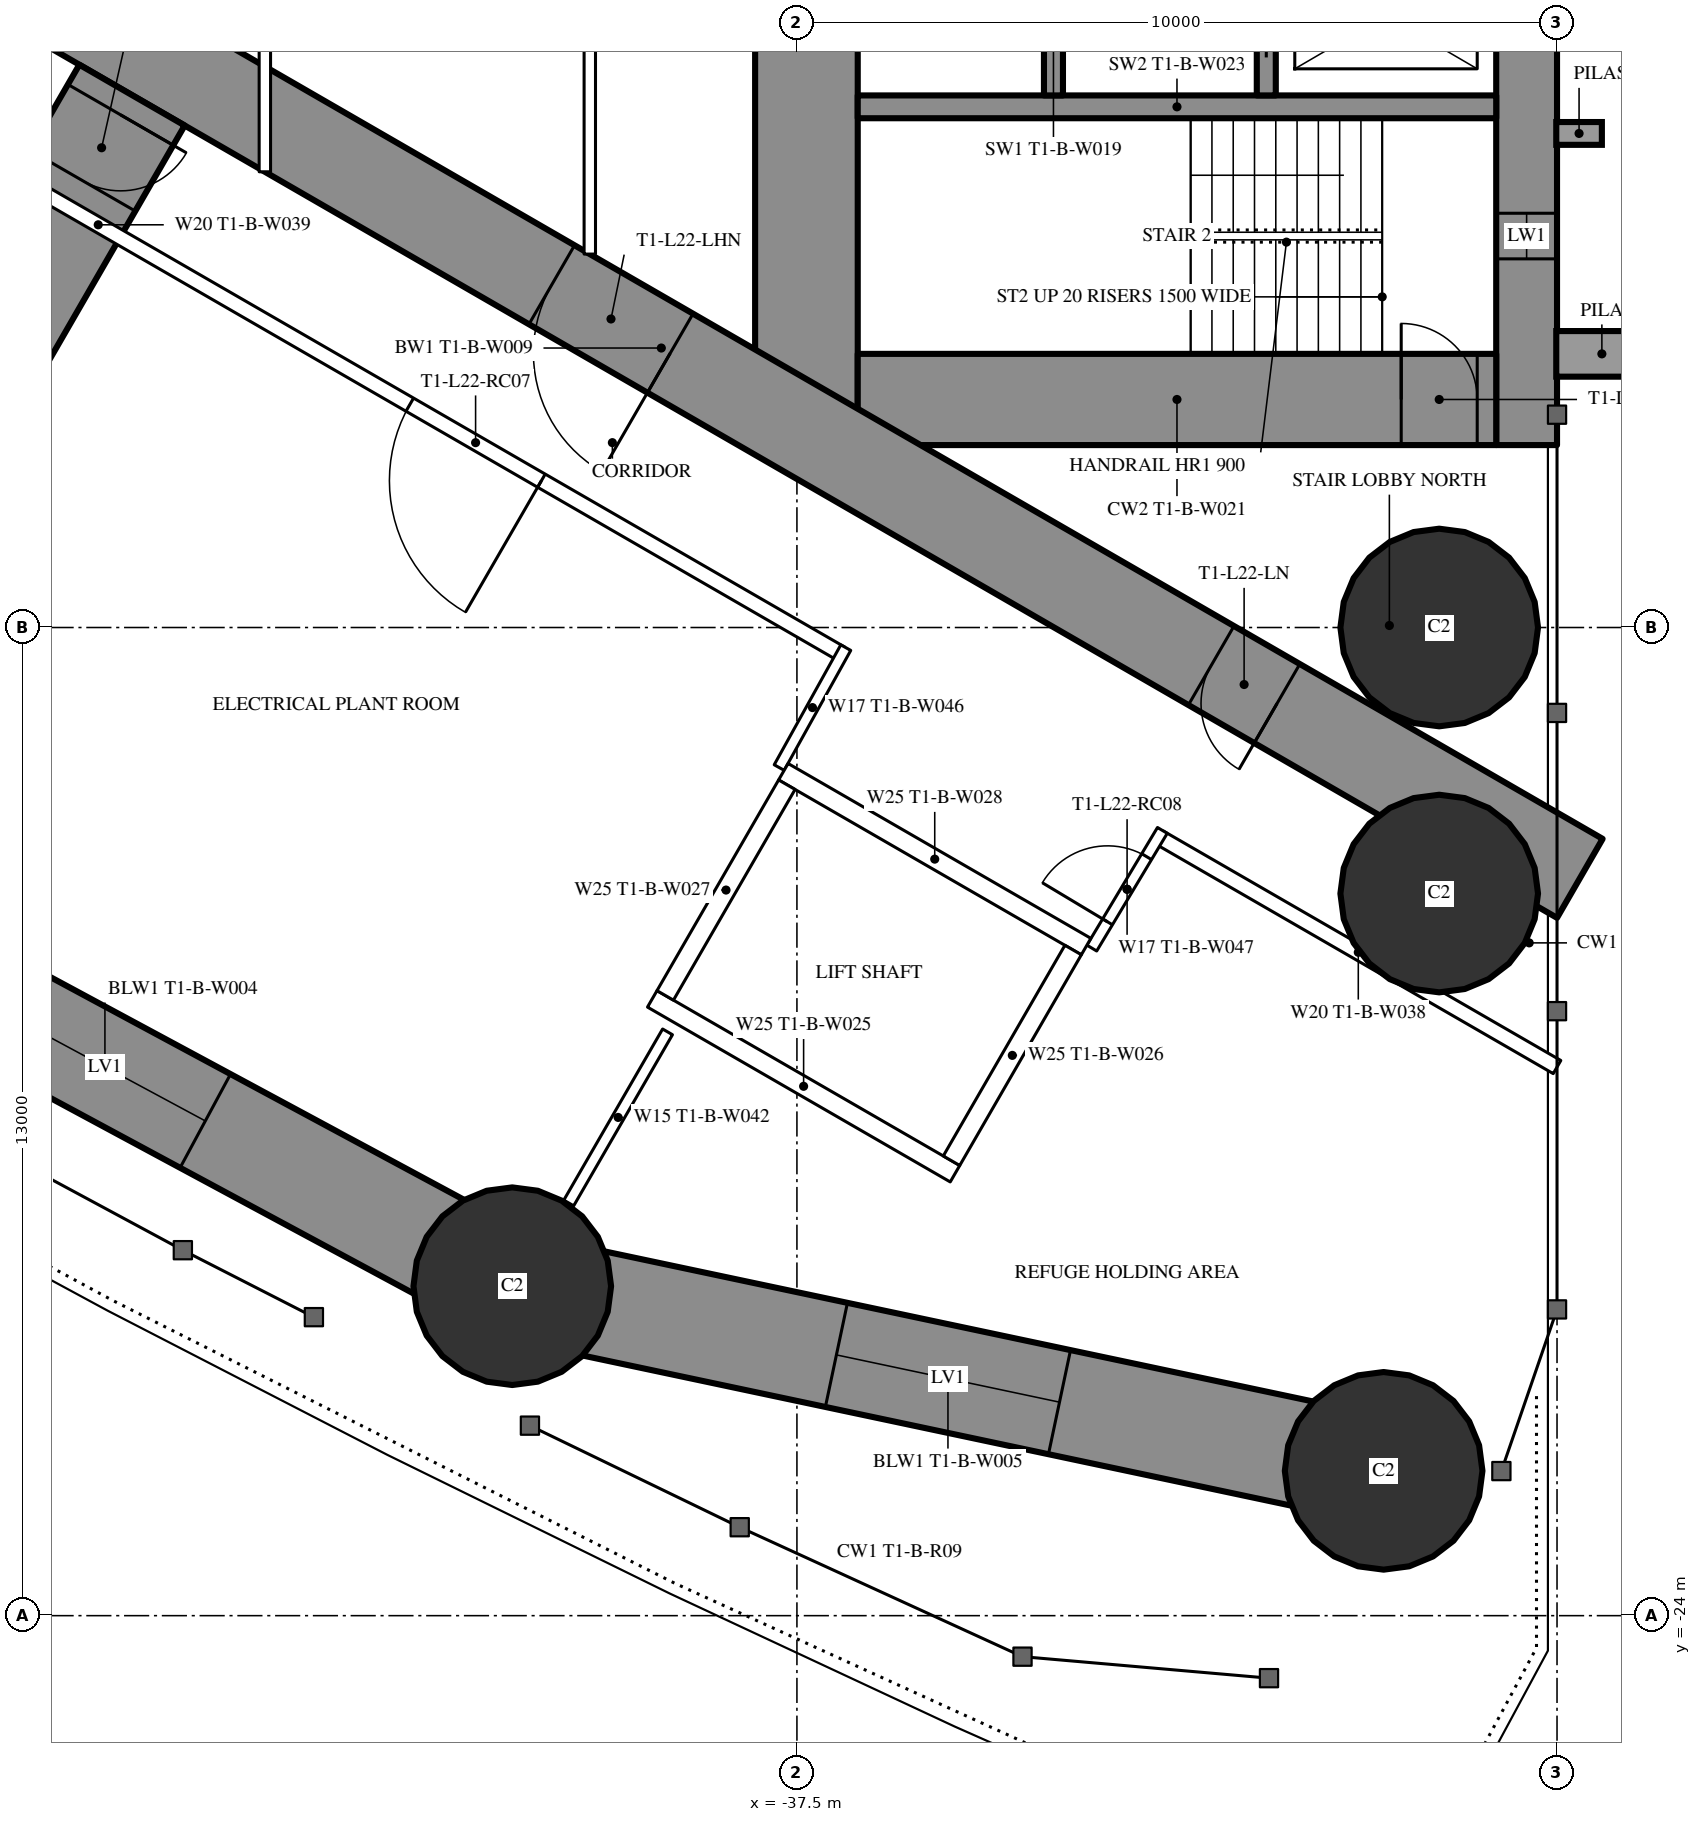
"""IFC4 building model, lengths in metres.
Left out: names, types, materials, properties, quantities, classifications, styles, units other than length and angle.
Written with IfcOpenShell. Run it as: python <this file> out.ifc"""

import sys

from ifc_helpers import new_model, si_unit, direction, frame, frame_2d, origin, origin_2d, place, context, subcontext, project, spatial, rectangle, hollow_circle, extrude, element, fill, save


model = new_model("IFC4")
c1 = context("Model", 3, precision=1e-05, world=origin(), true_north=direction((0.0, 1.0)))
c2 = subcontext(c1, "Body", "Model", "MODEL_VIEW")
j1 = project(units=[si_unit("LENGTHUNIT", "METRE"), si_unit("PLANEANGLEUNIT", "RADIAN")], contexts=[c1])
p1 = place(None, origin())
s1 = spatial("IfcSite", under=j1, at=p1, CompositionType="ELEMENT")
p2 = place(p1, origin())
s2 = spatial("IfcBuilding", under=s1, at=p2, CompositionType="ELEMENT")
p3 = place(p2, frame((0.0, 0.0, 87.0)))
s3 = spatial("IfcBuildingStorey", under=s2, at=p3, CompositionType="ELEMENT", Elevation=87.0)
for number, where, z_axis, x_axis in (
    (1, (-29.781, -22.095, 0.0), (0.0, 0.0, 1.0), (1.0, 0.0, 0.0)),
    (2, (-29.05, -11.0, 0.0), (0.0, 0.0, 1.0), (1.0, 0.0, 0.0)),
    (3, (-29.05, -14.5, 0.0), (0.0, 0.0, 1.0), (1.0, 0.0, 0.0)),
    (4, (-41.245, -19.666, 0.0), (0.0, 0.0, 1.0), (1.0, 0.0, 0.0)),
):
    element("IfcColumn", number, at=place(p3, frame(where, z_axis=z_axis, x_axis=x_axis)), inside=s3, PredefinedType="COLUMN", context=c2, shape_type="SweptSolid", body=[
        extrude(hollow_circle(Radius=1.3, WallThickness=0.1, at=origin_2d()), origin(), (0.0, 0.0, 1.0), 3.6),
    ])
p4 = place(p3, frame((-27.9, 8.6, 0.0), z_axis=(0.0, 0.0, 1.0), x_axis=(0.0, -1.0, 0.0)))
e5 = element("IfcWall", 5, at=p4, inside=s3, PredefinedType="SHEAR", context=c2, shape_type="SweptSolid", body=[
    extrude(rectangle(XDim=17.2, YDim=0.8, at=frame_2d((8.6, 0.0))), origin(), (0.0, 0.0, 1.0), 3.6),
])
p5 = place(p4, frame((2.45, 0.0, 0.6)))
e6 = element("IfcOpeningElement", 6, at=p5, cuts=e5, PredefinedType="OPENING", context=c2, shape_type="SweptSolid", body=[
    extrude(rectangle(XDim=0.6, YDim=2.1, at=frame_2d((0.3, 1.05))), frame((0.0, 0.41, 0.0), z_axis=(0.0, -1.0, 0.0), x_axis=(1.0, 0.0, 0.0)), (0.0, 0.0, 1.0), 0.82),
])
p6 = place(p4, frame((14.15, 0.0, 0.6)))
e7 = element("IfcOpeningElement", 7, at=p6, cuts=e5, PredefinedType="OPENING", context=c2, shape_type="SweptSolid", body=[
    extrude(rectangle(XDim=0.6, YDim=2.1, at=frame_2d((0.3, 1.05))), frame((0.0, 0.41, 0.0), z_axis=(0.0, -1.0, 0.0), x_axis=(1.0, 0.0, 0.0)), (0.0, 0.0, 1.0), 0.82),
])
p7 = place(p3, frame((-37.375, 8.6, 0.0), z_axis=(0.0, 0.0, 1.0), x_axis=(0.0, -1.0, 0.0)))
e8 = element("IfcWall", 8, at=p7, inside=s3, PredefinedType="SHEAR", context=c2, shape_type="SweptSolid", body=[
    extrude(rectangle(XDim=17.2, YDim=1.35, at=frame_2d((8.6, 0.0))), origin(), (0.0, 0.0, 1.0), 3.6),
])
p8 = place(p7, frame((7.7, 0.0, 0.0)))
e9 = element("IfcOpeningElement", 9, at=p8, cuts=e8, PredefinedType="OPENING", context=c2, shape_type="SweptSolid", body=[
    extrude(rectangle(XDim=1.8, YDim=2.2, at=frame_2d((0.9, 1.1))), frame((0.0, 0.685, 0.0), z_axis=(0.0, -1.0, 0.0), x_axis=(1.0, 0.0, 0.0)), (0.0, 0.0, 1.0), 1.37),
])
p9 = place(p3, frame((-28.3, -8.0, 0.0), z_axis=(0.0, 0.0, 1.0), x_axis=(-1.0, 0.0, 0.0)))
e10 = element("IfcWall", 10, at=p9, inside=s3, PredefinedType="SHEAR", context=c2, shape_type="SweptSolid", body=[
    extrude(rectangle(XDim=8.4, YDim=1.2, at=frame_2d((4.2, 0.0))), origin(), (0.0, 0.0, 1.0), 3.6),
])
p10 = place(p9, frame((0.25, 0.0, 0.0)))
e11 = element("IfcOpeningElement", 11, at=p10, cuts=e10, PredefinedType="OPENING", context=c2, shape_type="SweptSolid", body=[
    extrude(rectangle(XDim=1.0, YDim=2.2, at=frame_2d((0.5, 1.1))), frame((0.0, 0.61, 0.0), z_axis=(0.0, -1.0, 0.0), x_axis=(1.0, 0.0, 0.0)), (0.0, 0.0, 1.0), 1.22),
])
p11 = place(p3, frame((-28.3, -4.15, 0.0), z_axis=(0.0, 0.0, 1.0), x_axis=(-1.0, 0.0, 0.0)))
e12 = element("IfcWall", 12, at=p11, inside=s3, PredefinedType="SHEAR", context=c2, shape_type="SweptSolid", body=[
    extrude(rectangle(XDim=8.4, YDim=0.3, at=frame_2d((4.2, 0.0))), origin(), (0.0, 0.0, 1.0), 3.6),
])
p12 = place(p3, frame((-31.325, -1.9, 0.0), z_axis=(0.0, 0.0, 1.0), x_axis=(0.0, -1.0, 0.0)))
e13 = element("IfcWall", 13, at=p12, inside=s3, PredefinedType="SHEAR", context=c2, shape_type="SweptSolid", body=[
    extrude(rectangle(XDim=2.1, YDim=0.25, at=frame_2d((1.05, 0.0))), origin(), (0.0, 0.0, 1.0), 3.6),
])
p13 = place(p12, frame((0.5, 0.0, 0.0)))
e14 = element("IfcOpeningElement", 14, at=p13, cuts=e13, PredefinedType="OPENING", context=c2, shape_type="SweptSolid", body=[
    extrude(rectangle(XDim=1.1, YDim=2.2, at=frame_2d((0.55, 1.1))), frame((0.0, 0.135, 0.0), z_axis=(0.0, -1.0, 0.0), x_axis=(1.0, 0.0, 0.0)), (0.0, 0.0, 1.0), 0.27),
])
p14 = place(p3, frame((-34.125, -1.65, 0.0), z_axis=(0.0, 0.0, 1.0), x_axis=(0.0, -1.0, 0.0)))
e15 = element("IfcWall", 15, at=p14, inside=s3, PredefinedType="SHEAR", context=c2, shape_type="SweptSolid", body=[
    extrude(rectangle(XDim=2.35, YDim=0.25, at=frame_2d((1.175, 0.0))), origin(), (0.0, 0.0, 1.0), 3.6),
])
p15 = place(p3, frame((-27.2, -14.3, 0.0), z_axis=(0.0, 0.0, 1.0), x_axis=(-0.866024021859, 0.500002393557, 0.0)))
e16 = element("IfcWall", 16, at=p15, inside=s3, PredefinedType="SHEAR", context=c2, shape_type="SweptSolid", body=[
    extrude(rectangle(XDim=27.907, YDim=1.2, at=frame_2d((13.954, 0.0))), origin(), (0.0, 0.0, 1.0), 3.6),
])
p16 = place(p15, frame((4.6, 0.0, 0.0)))
e17 = element("IfcOpeningElement", 17, at=p16, cuts=e16, PredefinedType="OPENING", context=c2, shape_type="SweptSolid", body=[
    extrude(rectangle(XDim=1.0, YDim=2.2, at=frame_2d((0.5, 1.1))), frame((0.0, 0.61, 0.0), z_axis=(0.0, -1.0, 0.0), x_axis=(1.0, 0.0, 0.0)), (0.0, 0.0, 1.0), 1.22),
])
p17 = place(p15, frame((13.818, 0.0, 0.0)))
e18 = element("IfcOpeningElement", 18, at=p17, cuts=e16, PredefinedType="OPENING", context=c2, shape_type="SweptSolid", body=[
    extrude(rectangle(XDim=1.8, YDim=2.2, at=frame_2d((0.9, 1.1))), frame((0.0, 0.61, 0.0), z_axis=(0.0, -1.0, 0.0), x_axis=(1.0, 0.0, 0.0)), (0.0, 0.0, 1.0), 1.22),
])
p18 = place(p3, frame((-46.248, -3.996, 0.0), z_axis=(0.0, 0.0, 1.0), x_axis=(-0.499993613132, -0.866029091213, 0.0)))
e19 = element("IfcWall", 19, at=p18, inside=s3, PredefinedType="SHEAR", context=c2, shape_type="SweptSolid", body=[
    extrude(rectangle(XDim=11.431, YDim=1.6, at=frame_2d((5.715, 0.0))), origin(), (0.0, 0.0, 1.0), 3.6),
])
p19 = place(p18, frame((0.3, 0.0, 0.0)))
e20 = element("IfcOpeningElement", 20, at=p19, cuts=e19, PredefinedType="OPENING", context=c2, shape_type="SweptSolid", body=[
    extrude(rectangle(XDim=1.0, YDim=2.2, at=frame_2d((0.5, 1.1))), frame((0.0, 0.81, 0.0), z_axis=(0.0, -1.0, 0.0), x_axis=(1.0, 0.0, 0.0)), (0.0, 0.0, 1.0), 1.62),
])
p20 = place(p3, frame((-51.963, -13.895, 0.0), z_axis=(0.0, 0.0, 1.0), x_axis=(0.880492350889, -0.474060354835, 0.0)))
e21 = element("IfcWall", 21, at=p20, inside=s3, PredefinedType="SHEAR", context=c2, shape_type="SweptSolid", body=[
    extrude(rectangle(XDim=12.173, YDim=1.4, at=frame_2d((6.086, 0.0))), origin(), (0.0, 0.0, 1.0), 3.6),
])
p21 = place(p20, frame((4.586, 0.0, 0.6)))
e22 = element("IfcOpeningElement", 22, at=p21, cuts=e21, PredefinedType="OPENING", context=c2, shape_type="SweptSolid", body=[
    extrude(rectangle(XDim=3.0, YDim=1.2, at=frame_2d((1.5, 0.6))), frame((0.0, 0.71, 0.0), z_axis=(0.0, -1.0, 0.0), x_axis=(1.0, 0.0, 0.0)), (0.0, 0.0, 1.0), 1.42),
])
p22 = place(p3, frame((-41.245, -19.666, 0.0), z_axis=(0.0, 0.0, 1.0), x_axis=(0.978282156247, -0.207277646573, 0.0)))
e23 = element("IfcWall", 23, at=p22, inside=s3, PredefinedType="SHEAR", context=c2, shape_type="SweptSolid", body=[
    extrude(rectangle(XDim=11.718, YDim=1.4, at=frame_2d((5.859, 0.0))), origin(), (0.0, 0.0, 1.0), 3.6),
])
p23 = place(p22, frame((4.359, 0.0, 0.6)))
e24 = element("IfcOpeningElement", 24, at=p23, cuts=e23, PredefinedType="OPENING", context=c2, shape_type="SweptSolid", body=[
    extrude(rectangle(XDim=3.0, YDim=1.2, at=frame_2d((1.5, 0.6))), frame((0.0, 0.71, 0.0), z_axis=(0.0, -1.0, 0.0), x_axis=(1.0, 0.0, 0.0)), (0.0, 0.0, 1.0), 1.42),
])
p24 = place(p3, frame((-39.202, -16.32, 0.0), z_axis=(0.0, 0.0, 1.0), x_axis=(-0.49997716683, -0.86603858612, 0.0)))
e25 = element("IfcWall", 25, at=p24, inside=s3, PredefinedType="PARTITIONING", context=c2, shape_type="SweptSolid", body=[
    extrude(rectangle(XDim=2.6, YDim=0.15, at=frame_2d((1.3, 0.0))), origin(), (0.0, 0.0, 1.0), 3.35),
])
p25 = place(p3, frame((-27.5, -16.782, 0.0), z_axis=(0.0, 0.0, 1.0), x_axis=(-0.866030050624, 0.499991951352, 0.0)))
e26 = element("IfcWall", 26, at=p25, inside=s3, PredefinedType="PARTITIONING", context=c2, shape_type="SweptSolid", body=[
    extrude(rectangle(XDim=6.038, YDim=0.2, at=frame_2d((3.019, 0.0))), origin(), (0.0, 0.0, 1.0), 3.35),
])
p26 = place(p3, frame((-36.92, -11.344, 0.0), z_axis=(0.0, 0.0, 1.0), x_axis=(-0.866028313256, 0.499994960614, 0.0)))
e27 = element("IfcWall", 27, at=p26, inside=s3, PredefinedType="PARTITIONING", context=c2, shape_type="SweptSolid", body=[
    extrude(rectangle(XDim=22.568, YDim=0.2, at=frame_2d((11.284, 0.0))), origin(), (0.0, 0.0, 1.0), 3.35),
])
p27 = place(p26, frame((15.994, 0.0, 0.0)))
e28 = element("IfcOpeningElement", 28, at=p27, cuts=e27, PredefinedType="OPENING", context=c2, shape_type="SweptSolid", body=[
    extrude(rectangle(XDim=1.8, YDim=2.2, at=frame_2d((0.9, 1.1))), frame((0.0, 0.11, 0.0), z_axis=(0.0, -1.0, 0.0), x_axis=(1.0, 0.0, 0.0)), (0.0, 0.0, 1.0), 0.22),
])
p28 = place(p26, frame((4.551, 0.0, 0.0)))
e29 = element("IfcOpeningElement", 29, at=p28, cuts=e27, PredefinedType="OPENING", context=c2, shape_type="SweptSolid", body=[
    extrude(rectangle(XDim=2.0, YDim=2.4, at=frame_2d((1.0, 1.2))), frame((0.0, 0.11, 0.0), z_axis=(0.0, -1.0, 0.0), x_axis=(1.0, 0.0, 0.0)), (0.0, 0.0, 1.0), 0.22),
])
p29 = place(p3, frame((-36.857, -11.265, 0.0), z_axis=(0.0, 0.0, 1.0), x_axis=(-0.485482130951, -0.874246590229, 0.0)))
e30 = element("IfcWall", 30, at=p29, inside=s3, PredefinedType="PARTITIONING", context=c2, shape_type="SweptSolid", body=[
    extrude(rectangle(XDim=1.805, YDim=0.15, at=frame_2d((0.902, 0.0))), origin(), (0.0, 0.0, 1.0), 3.35),
])
p30 = place(p3, frame((-33.621, -15.218, 0.0), z_axis=(0.0, 0.0, 1.0), x_axis=(0.514336634837, 0.857588377991, 0.0)))
e31 = element("IfcWall", 31, at=p30, inside=s3, PredefinedType="PARTITIONING", context=c2, shape_type="SweptSolid", body=[
    extrude(rectangle(XDim=1.805, YDim=0.15, at=frame_2d((0.903, 0.0))), origin(), (0.0, 0.0, 1.0), 3.35),
])
p31 = place(p30, frame((0.403, 0.0, 0.0)))
e32 = element("IfcOpeningElement", 32, at=p31, cuts=e31, PredefinedType="OPENING", context=c2, shape_type="SweptSolid", body=[
    extrude(rectangle(XDim=1.0, YDim=2.03, at=frame_2d((0.5, 1.015))), frame((0.0, 0.085, 0.0), z_axis=(0.0, -1.0, 0.0), x_axis=(1.0, 0.0, 0.0)), (0.0, 0.0, 1.0), 0.17),
])
p32 = place(p3, frame((-40.225, 6.087, 0.0), z_axis=(0.0, 0.0, 1.0), x_axis=(0.0, -1.0, 0.0)))
e33 = element("IfcWall", 33, at=p32, inside=s3, PredefinedType="PARTITIONING", context=c2, shape_type="SweptSolid", body=[
    extrude(rectangle(XDim=12.174, YDim=0.15, at=frame_2d((6.087, 0.0))), origin(), (0.0, 0.0, 1.0), 3.35),
])
p33 = place(p32, frame((5.187, 0.0, 0.0)))
e34 = element("IfcOpeningElement", 34, at=p33, cuts=e33, PredefinedType="OPENING", context=c2, shape_type="SweptSolid", body=[
    extrude(rectangle(XDim=1.8, YDim=2.2, at=frame_2d((0.9, 1.1))), frame((0.0, 0.085, 0.0), z_axis=(0.0, -1.0, 0.0), x_axis=(1.0, 0.0, 0.0)), (0.0, 0.0, 1.0), 0.17),
])
p34 = place(p3, frame((-44.5, 4.169, 0.0), z_axis=(0.0, 0.0, 1.0), x_axis=(0.0, -1.0, 0.0)))
e35 = element("IfcWall", 35, at=p34, inside=s3, PredefinedType="PARTITIONING", context=c2, shape_type="SweptSolid", body=[
    extrude(rectangle(XDim=9.173, YDim=0.15, at=frame_2d((4.587, 0.0))), origin(), (0.0, 0.0, 1.0), 3.35),
])
p35 = place(p34, frame((3.669, 0.0, 0.0)))
e36 = element("IfcOpeningElement", 36, at=p35, cuts=e35, PredefinedType="OPENING", context=c2, shape_type="SweptSolid", body=[
    extrude(rectangle(XDim=1.0, YDim=2.2, at=frame_2d((0.5, 1.1))), frame((0.0, 0.085, 0.0), z_axis=(0.0, -1.0, 0.0), x_axis=(1.0, 0.0, 0.0)), (0.0, 0.0, 1.0), 0.17),
])
p36 = place(p3, frame((-33.696, -15.197, 0.0), z_axis=(0.0, 0.0, 1.0), x_axis=(-0.865976953817, 0.500083908417, 0.0)))
e37 = element("IfcWall", 37, at=p36, inside=s3, PredefinedType="PARTITIONING", context=c2, shape_type="SweptSolid", body=[
    extrude(rectangle(XDim=4.599, YDim=0.25, at=frame_2d((2.3, 0.0))), origin(), (0.0, 0.0, 1.0), 3.35),
])
p37 = place(p3, frame((-35.42, -18.186, 0.0), z_axis=(0.0, 0.0, 1.0), x_axis=(-0.865990227814, 0.50006092162, 0.0)))
e38 = element("IfcWall", 38, at=p37, inside=s3, PredefinedType="PARTITIONING", context=c2, shape_type="SweptSolid", body=[
    extrude(rectangle(XDim=4.6, YDim=0.25, at=frame_2d((2.3, 0.0))), origin(), (0.0, 0.0, 1.0), 3.35),
])
p38 = place(p3, frame((-33.866, -15.243, 0.0), z_axis=(0.0, 0.0, 1.0), x_axis=(-0.499929347863, -0.866066190972, 0.0)))
e39 = element("IfcWall", 39, at=p38, inside=s3, PredefinedType="PARTITIONING", context=c2, shape_type="SweptSolid", body=[
    extrude(rectangle(XDim=3.201, YDim=0.25, at=frame_2d((1.6, 0.0))), origin(), (0.0, 0.0, 1.0), 3.35),
])
p39 = place(p3, frame((-37.633, -13.068, 0.0), z_axis=(0.0, 0.0, 1.0), x_axis=(-0.499872130319, -0.866099216793, 0.0)))
e40 = element("IfcWall", 40, at=p39, inside=s3, PredefinedType="PARTITIONING", context=c2, shape_type="SweptSolid", body=[
    extrude(rectangle(XDim=3.2, YDim=0.25, at=frame_2d((1.6, 0.0))), origin(), (0.0, 0.0, 1.0), 3.35),
])
p40 = place(p21, origin())
e41 = element("IfcWindow", 41, at=p40, inside=s3, PartitioningType="SINGLE_PANEL", PredefinedType="WINDOW", context=c2, shape_type="SweptSolid", body=[
    extrude(rectangle(XDim=3.0, YDim=1.2, at=frame_2d((1.5, 0.6))), frame((0.0, 0.03, 0.0), z_axis=(0.0, -1.0, 0.0), x_axis=(1.0, 0.0, 0.0)), (0.0, 0.0, 1.0), 0.06),
])
fill(e22, e41)
p41 = place(p23, origin())
e42 = element("IfcWindow", 42, at=p41, inside=s3, PartitioningType="SINGLE_PANEL", PredefinedType="WINDOW", context=c2, shape_type="SweptSolid", body=[
    extrude(rectangle(XDim=3.0, YDim=1.2, at=frame_2d((1.5, 0.6))), frame((0.0, 0.03, 0.0), z_axis=(0.0, -1.0, 0.0), x_axis=(1.0, 0.0, 0.0)), (0.0, 0.0, 1.0), 0.06),
])
fill(e24, e42)
p42 = place(p19, origin())
e43 = element("IfcDoor", 43, at=p42, inside=s3, OperationType="SINGLE_SWING_LEFT", PredefinedType="DOOR", context=c2, shape_type="SweptSolid", body=[
    extrude(rectangle(XDim=1.0, YDim=2.2, at=frame_2d((0.5, 1.1))), frame((0.0, 0.025, 0.0), z_axis=(0.0, -1.0, 0.0), x_axis=(1.0, 0.0, 0.0)), (0.0, 0.0, 1.0), 0.05),
])
fill(e20, e43)
p43 = place(p28, origin())
e44 = element("IfcDoor", 44, at=p43, inside=s3, OperationType="DOUBLE_DOOR_SINGLE_SWING", PredefinedType="DOOR", context=c2, shape_type="SweptSolid", body=[
    extrude(rectangle(XDim=2.0, YDim=2.4, at=frame_2d((1.0, 1.2))), frame((0.0, 0.025, 0.0), z_axis=(0.0, -1.0, 0.0), x_axis=(1.0, 0.0, 0.0)), (0.0, 0.0, 1.0), 0.05),
])
fill(e29, e44)
p44 = place(p31, origin())
e45 = element("IfcDoor", 45, at=p44, inside=s3, OperationType="SINGLE_SWING_LEFT", PredefinedType="DOOR", context=c2, shape_type="SweptSolid", body=[
    extrude(rectangle(XDim=1.0, YDim=2.03, at=frame_2d((0.5, 1.015))), frame((0.0, 0.025, 0.0), z_axis=(0.0, -1.0, 0.0), x_axis=(1.0, 0.0, 0.0)), (0.0, 0.0, 1.0), 0.05),
])
fill(e32, e45)
p45 = place(p16, origin())
e46 = element("IfcDoor", 46, at=p45, inside=s3, OperationType="SINGLE_SWING_LEFT", PredefinedType="DOOR", context=c2, shape_type="SweptSolid", body=[
    extrude(rectangle(XDim=1.0, YDim=2.2, at=frame_2d((0.5, 1.1))), frame((0.0, 0.025, 0.0), z_axis=(0.0, -1.0, 0.0), x_axis=(1.0, 0.0, 0.0)), (0.0, 0.0, 1.0), 0.05),
])
fill(e17, e46)
p46 = place(p17, origin())
e47 = element("IfcDoor", 47, at=p46, inside=s3, OperationType="DOUBLE_DOOR_SINGLE_SWING", PredefinedType="DOOR", context=c2, shape_type="SweptSolid", body=[
    extrude(rectangle(XDim=1.8, YDim=2.2, at=frame_2d((0.9, 1.1))), frame((0.0, 0.025, 0.0), z_axis=(0.0, -1.0, 0.0), x_axis=(1.0, 0.0, 0.0)), (0.0, 0.0, 1.0), 0.05),
])
fill(e18, e47)
p47 = place(p10, origin())
e48 = element("IfcDoor", 48, at=p47, inside=s3, OperationType="SINGLE_SWING_RIGHT", PredefinedType="DOOR", context=c2, shape_type="SweptSolid", body=[
    extrude(rectangle(XDim=1.0, YDim=2.2, at=frame_2d((0.5, 1.1))), frame((0.0, 0.025, 0.0), z_axis=(0.0, -1.0, 0.0), x_axis=(1.0, 0.0, 0.0)), (0.0, 0.0, 1.0), 0.05),
])
fill(e11, e48)
p48 = place(p13, origin())
e49 = element("IfcDoor", 49, at=p48, inside=s3, OperationType="SLIDING_TO_LEFT", PredefinedType="USERDEFINED", context=c2, shape_type="SweptSolid", body=[
    extrude(rectangle(XDim=1.1, YDim=2.2, at=frame_2d((0.55, 1.1))), frame((0.0, 0.025, 0.0), z_axis=(0.0, -1.0, 0.0), x_axis=(1.0, 0.0, 0.0)), (0.0, 0.0, 1.0), 0.05),
])
fill(e14, e49)
p49 = place(p6, origin())
e50 = element("IfcWindow", 50, at=p49, inside=s3, PartitioningType="SINGLE_PANEL", PredefinedType="WINDOW", context=c2, shape_type="SweptSolid", body=[
    extrude(rectangle(XDim=0.6, YDim=2.1, at=frame_2d((0.3, 1.05))), frame((0.0, 0.03, 0.0), z_axis=(0.0, -1.0, 0.0), x_axis=(1.0, 0.0, 0.0)), (0.0, 0.0, 1.0), 0.06),
])
fill(e7, e50)
save(model, sys.argv[1])
